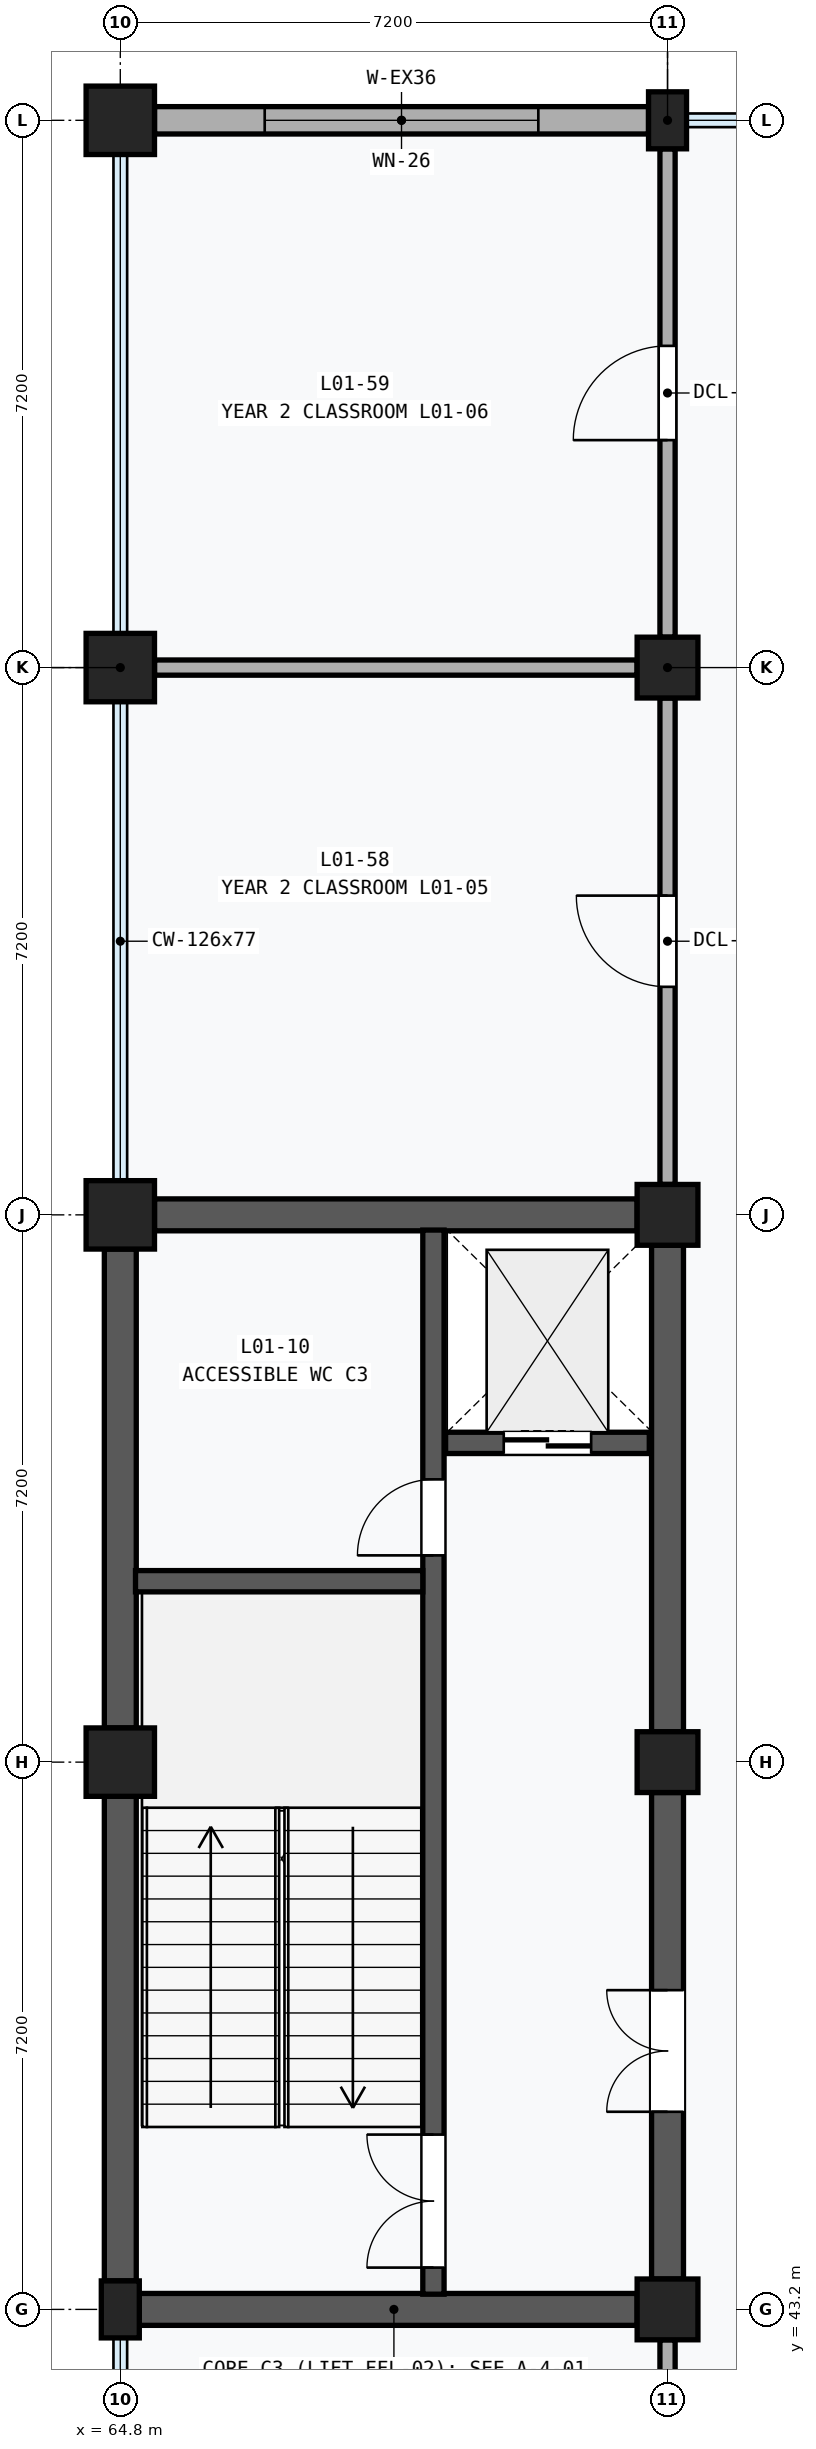
"""IFC4 building model, lengths in metres.
Left out: names, types, materials, properties, quantities, classifications, styles, units other than length and angle.
Written with IfcOpenShell. Run it as: python <this file> out.ifc"""

import sys

from ifc_helpers import new_model, si_unit, direction, frame, frame_2d, origin, origin_2d, place, context, subcontext, project, spatial, rectangle, extrude, element, fill, save


model = new_model("IFC4")
c1 = context("Model", 3, precision=1e-05, world=origin(), true_north=direction((0.0, 1.0)))
c2 = subcontext(c1, "Body", "Model", "MODEL_VIEW")
j1 = project(units=[si_unit("LENGTHUNIT", "METRE"), si_unit("PLANEANGLEUNIT", "RADIAN")], contexts=[c1])
p1 = place(None, origin())
s1 = spatial("IfcSite", under=j1, at=p1, CompositionType="ELEMENT")
p2 = place(p1, origin())
s2 = spatial("IfcBuilding", under=s1, at=p2, CompositionType="ELEMENT")
p3 = place(p2, frame((0.0, 0.0, 4.8)))
s3 = spatial("IfcBuildingStorey", under=s2, at=p3, CompositionType="ELEMENT", Elevation=4.8)
p4 = place(p3, frame((64.8, 43.2, 0.0), z_axis=(0.0, 0.0, 1.0), x_axis=(1.0, 0.0, 0.0)))
e1 = element("IfcColumn", 1, at=p4, inside=s3, PredefinedType="PILASTER", context=c2, shape_type="SweptSolid", body=[
    extrude(rectangle(XDim=0.5, YDim=0.75, at=origin_2d()), origin(), (0.0, 0.0, 1.0), 4.8),
])
for number, where, z_axis, x_axis in (
    (2, (64.8, 50.4, 0.0), (0.0, 0.0, 1.0), (1.0, 0.0, 0.0)),
    (3, (64.8, 57.6, 0.0), (0.0, 0.0, 1.0), (1.0, 0.0, 0.0)),
    (4, (64.8, 64.8, 0.0), (0.0, 0.0, 1.0), (1.0, 0.0, 0.0)),
    (5, (64.8, 72.0, 0.0), (0.0, 0.0, 1.0), (1.0, 0.0, 0.0)),
):
    element("IfcColumn", number, at=place(p3, frame(where, z_axis=z_axis, x_axis=x_axis)), inside=s3, PredefinedType="COLUMN", context=c2, shape_type="SweptSolid", body=[
        extrude(rectangle(XDim=0.9, YDim=0.9, at=origin_2d()), origin(), (0.0, 0.0, 1.0), 4.8),
    ])
for number, where, z_axis, x_axis in (
    (6, (72.0, 43.2, 0.0), (0.0, 0.0, 1.0), (1.0, 0.0, 0.0)),
    (7, (72.0, 50.4, 0.0), (0.0, 0.0, 1.0), (1.0, 0.0, 0.0)),
    (8, (72.0, 57.6, 0.0), (0.0, 0.0, 1.0), (1.0, 0.0, 0.0)),
    (9, (72.0, 64.8, 0.0), (0.0, 0.0, 1.0), (1.0, 0.0, 0.0)),
):
    element("IfcColumn", number, at=place(p3, frame(where, z_axis=z_axis, x_axis=x_axis)), inside=s3, PredefinedType="COLUMN", context=c2, shape_type="SweptSolid", body=[
        extrude(rectangle(XDim=0.8, YDim=0.8, at=origin_2d()), origin(), (0.0, 0.0, 1.0), 4.8),
    ])
p5 = place(p3, frame((72.0, 72.0, 0.0), z_axis=(0.0, 0.0, 1.0), x_axis=(1.0, 0.0, 0.0)))
e10 = element("IfcColumn", 10, at=p5, inside=s3, PredefinedType="PILASTER", context=c2, shape_type="SweptSolid", body=[
    extrude(rectangle(XDim=0.5, YDim=0.75, at=origin_2d()), origin(), (0.0, 0.0, 1.0), 4.8),
])
p6 = place(p3, frame((65.25, 72.0, 0.0), z_axis=(0.0, 0.0, 1.0), x_axis=(1.0, 0.0, 0.0)))
e11 = element("IfcWall", 11, at=p6, inside=s3, PredefinedType="SOLIDWALL", context=c2, shape_type="SweptSolid", body=[
    extrude(rectangle(XDim=6.5, YDim=0.36, at=frame_2d((3.25, 0.0))), origin(), (0.0, 0.0, 1.0), 3.85),
])
p7 = place(p6, frame((1.45, 0.0, 0.7)))
e12 = element("IfcOpeningElement", 12, at=p7, cuts=e11, PredefinedType="OPENING", context=c2, shape_type="SweptSolid", body=[
    extrude(rectangle(XDim=3.6, YDim=2.2, at=frame_2d((1.8, 1.1))), frame((0.0, 0.192, 0.0), z_axis=(0.0, -1.0, 0.0), x_axis=(1.0, 0.0, 0.0)), (0.0, 0.0, 1.0), 0.384),
])
p8 = place(p3, frame((64.8, 43.575, 0.0), z_axis=(0.0, 0.0, 1.0), x_axis=(0.0, 1.0, 0.0)))
e13 = element("IfcWall", 13, at=p8, inside=s3, PredefinedType="SHEAR", context=c2, shape_type="SweptSolid", body=[
    extrude(rectangle(XDim=6.375, YDim=0.42, at=frame_2d((3.188, 0.0))), origin(), (0.0, 0.0, 1.0), 3.85),
])
p9 = place(p3, frame((64.8, 50.85, 0.0), z_axis=(0.0, 0.0, 1.0), x_axis=(0.0, 1.0, 0.0)))
e14 = element("IfcWall", 14, at=p9, inside=s3, PredefinedType="SHEAR", context=c2, shape_type="SweptSolid", body=[
    extrude(rectangle(XDim=6.3, YDim=0.42, at=frame_2d((3.15, 0.0))), origin(), (0.0, 0.0, 1.0), 3.85),
])
p10 = place(p3, frame((72.0, 43.6, 0.0), z_axis=(0.0, 0.0, 1.0), x_axis=(0.0, 1.0, 0.0)))
e15 = element("IfcWall", 15, at=p10, inside=s3, PredefinedType="SHEAR", context=c2, shape_type="SweptSolid", body=[
    extrude(rectangle(XDim=6.4, YDim=0.42, at=frame_2d((3.2, 0.0))), origin(), (0.0, 0.0, 1.0), 3.58),
])
p11 = place(p10, frame((2.2, 0.0, 0.0)))
e16 = element("IfcOpeningElement", 16, at=p11, cuts=e15, PredefinedType="OPENING", context=c2, shape_type="SweptSolid", body=[
    extrude(rectangle(XDim=1.6, YDim=2.2, at=frame_2d((0.8, 1.1))), frame((0.0, 0.222, 0.0), z_axis=(0.0, -1.0, 0.0), x_axis=(1.0, 0.0, 0.0)), (0.0, 0.0, 1.0), 0.444),
])
p12 = place(p3, frame((72.0, 50.8, 0.0), z_axis=(0.0, 0.0, 1.0), x_axis=(0.0, 1.0, 0.0)))
e17 = element("IfcWall", 17, at=p12, inside=s3, PredefinedType="SHEAR", context=c2, shape_type="SweptSolid", body=[
    extrude(rectangle(XDim=6.4, YDim=0.42, at=frame_2d((3.2, 0.0))), origin(), (0.0, 0.0, 1.0), 3.58),
])
p13 = place(p3, frame((65.05, 43.2, 0.0), z_axis=(0.0, 0.0, 1.0), x_axis=(1.0, 0.0, 0.0)))
e18 = element("IfcWall", 18, at=p13, inside=s3, PredefinedType="SHEAR", context=c2, shape_type="SweptSolid", body=[
    extrude(rectangle(XDim=6.55, YDim=0.42, at=frame_2d((3.275, 0.0))), origin(), (0.0, 0.0, 1.0), 3.58),
])
p14 = place(p3, frame((65.25, 57.6, 0.0), z_axis=(0.0, 0.0, 1.0), x_axis=(1.0, 0.0, 0.0)))
e19 = element("IfcWall", 19, at=p14, inside=s3, PredefinedType="SHEAR", context=c2, shape_type="SweptSolid", body=[
    extrude(rectangle(XDim=6.35, YDim=0.42, at=frame_2d((3.175, 0.0))), origin(), (0.0, 0.0, 1.0), 3.58),
])
p15 = place(p3, frame((68.92, 43.4, 0.0), z_axis=(0.0, 0.0, 1.0), x_axis=(0.0, 1.0, 0.0)))
e20 = element("IfcWall", 20, at=p15, inside=s3, PredefinedType="SHEAR", context=c2, shape_type="SweptSolid", body=[
    extrude(rectangle(XDim=14.0, YDim=0.28, at=frame_2d((7.0, 0.0))), origin(), (0.0, 0.0, 1.0), 4.48),
])
p16 = place(p15, frame((0.35, 0.0, 0.0)))
e21 = element("IfcOpeningElement", 21, at=p16, cuts=e20, PredefinedType="OPENING", context=c2, shape_type="SweptSolid", body=[
    extrude(rectangle(XDim=1.75, YDim=2.15, at=frame_2d((0.875, 1.075))), frame((0.0, 0.152, 0.0), z_axis=(0.0, -1.0, 0.0), x_axis=(1.0, 0.0, 0.0)), (0.0, 0.0, 1.0), 0.304),
])
p17 = place(p15, frame((9.72, 0.0, 0.0)))
e22 = element("IfcOpeningElement", 22, at=p17, cuts=e20, PredefinedType="OPENING", context=c2, shape_type="SweptSolid", body=[
    extrude(rectangle(XDim=1.0, YDim=2.15, at=frame_2d((0.5, 1.075))), frame((0.0, 0.152, 0.0), z_axis=(0.0, -1.0, 0.0), x_axis=(1.0, 0.0, 0.0)), (0.0, 0.0, 1.0), 0.304),
])
p18 = place(p3, frame((65.0, 52.78, 0.0), z_axis=(0.0, 0.0, 1.0), x_axis=(1.0, 0.0, 0.0)))
e23 = element("IfcWall", 23, at=p18, inside=s3, PredefinedType="SHEAR", context=c2, shape_type="SweptSolid", body=[
    extrude(rectangle(XDim=3.78, YDim=0.28, at=frame_2d((1.89, 0.0))), origin(), (0.0, 0.0, 1.0), 4.48),
])
p19 = place(p3, frame((69.08, 54.6, 0.0), z_axis=(0.0, 0.0, 1.0), x_axis=(1.0, 0.0, 0.0)))
e24 = element("IfcWall", 24, at=p19, inside=s3, PredefinedType="SHEAR", context=c2, shape_type="SweptSolid", body=[
    extrude(rectangle(XDim=2.68, YDim=0.28, at=frame_2d((1.34, 0.0))), origin(), (0.0, 0.0, 1.0), 4.48),
])
p20 = place(p19, frame((0.765, 0.0, 0.0)))
e25 = element("IfcOpeningElement", 25, at=p20, cuts=e24, PredefinedType="OPENING", context=c2, shape_type="SweptSolid", body=[
    extrude(rectangle(XDim=1.15, YDim=2.2, at=frame_2d((0.575, 1.1))), frame((0.0, 0.152, 0.0), z_axis=(0.0, -1.0, 0.0), x_axis=(1.0, 0.0, 0.0)), (0.0, 0.0, 1.0), 0.304),
])
p21 = place(p3, frame((72.0, 36.4, 0.0), z_axis=(0.0, 0.0, 1.0), x_axis=(0.0, 1.0, 0.0)))
e26 = element("IfcWall", 26, at=p21, inside=s3, PredefinedType="PARTITIONING", context=c2, shape_type="SweptSolid", body=[
    extrude(rectangle(XDim=6.4, YDim=0.2, at=frame_2d((3.2, 0.0))), origin(), (0.0, 0.0, 1.0), 3.58),
])
p22 = place(p21, frame((2.62, 0.0, 0.0)))
e27 = element("IfcOpeningElement", 27, at=p22, cuts=e26, PredefinedType="OPENING", context=c2, shape_type="SweptSolid", body=[
    extrude(rectangle(XDim=1.16, YDim=2.22, at=frame_2d((0.58, 1.11))), frame((0.0, 0.112, 0.0), z_axis=(0.0, -1.0, 0.0), x_axis=(1.0, 0.0, 0.0)), (0.0, 0.0, 1.0), 0.224),
])
p23 = place(p3, frame((65.25, 64.8, 0.0), z_axis=(0.0, 0.0, 1.0), x_axis=(1.0, 0.0, 0.0)))
e28 = element("IfcWall", 28, at=p23, inside=s3, PredefinedType="PARTITIONING", context=c2, shape_type="SweptSolid", body=[
    extrude(rectangle(XDim=6.35, YDim=0.2, at=frame_2d((3.175, 0.0))), origin(), (0.0, 0.0, 1.0), 3.58),
])
p24 = place(p3, frame((72.0, 58.0, 0.0), z_axis=(0.0, 0.0, 1.0), x_axis=(0.0, 1.0, 0.0)))
e29 = element("IfcWall", 29, at=p24, inside=s3, PredefinedType="PARTITIONING", context=c2, shape_type="SweptSolid", body=[
    extrude(rectangle(XDim=6.4, YDim=0.2, at=frame_2d((3.2, 0.0))), origin(), (0.0, 0.0, 1.0), 3.58),
])
p25 = place(p24, frame((2.6, 0.0, 0.0)))
e30 = element("IfcOpeningElement", 30, at=p25, cuts=e29, PredefinedType="OPENING", context=c2, shape_type="SweptSolid", body=[
    extrude(rectangle(XDim=1.2, YDim=2.24, at=frame_2d((0.6, 1.12))), frame((0.0, 0.112, 0.0), z_axis=(0.0, -1.0, 0.0), x_axis=(1.0, 0.0, 0.0)), (0.0, 0.0, 1.0), 0.224),
])
p26 = place(p3, frame((72.0, 65.2, 0.0), z_axis=(0.0, 0.0, 1.0), x_axis=(0.0, 1.0, 0.0)))
e31 = element("IfcWall", 31, at=p26, inside=s3, PredefinedType="PARTITIONING", context=c2, shape_type="SweptSolid", body=[
    extrude(rectangle(XDim=6.425, YDim=0.2, at=frame_2d((3.212, 0.0))), origin(), (0.0, 0.0, 1.0), 3.58),
])
p27 = place(p26, frame((2.593, 0.0, 0.0)))
e32 = element("IfcOpeningElement", 32, at=p27, cuts=e31, PredefinedType="OPENING", context=c2, shape_type="SweptSolid", body=[
    extrude(rectangle(XDim=1.24, YDim=2.26, at=frame_2d((0.62, 1.13))), frame((0.0, 0.112, 0.0), z_axis=(0.0, -1.0, 0.0), x_axis=(1.0, 0.0, 0.0)), (0.0, 0.0, 1.0), 0.224),
])
p28 = place(p7, origin())
e33 = element("IfcWindow", 33, at=p28, inside=s3, PartitioningType="SINGLE_PANEL", PredefinedType="WINDOW", context=c2, shape_type="SweptSolid", body=[
    extrude(rectangle(XDim=3.6, YDim=2.2, at=frame_2d((1.8, 1.1))), frame((0.0, 0.03, 0.0), z_axis=(0.0, -1.0, 0.0), x_axis=(1.0, 0.0, 0.0)), (0.0, 0.0, 1.0), 0.06),
])
fill(e12, e33)
p29 = place(p11, origin())
e34 = element("IfcDoor", 34, at=p29, inside=s3, OperationType="DOUBLE_DOOR_SINGLE_SWING", PredefinedType="DOOR", context=c2, shape_type="SweptSolid", body=[
    extrude(rectangle(XDim=1.6, YDim=2.2, at=frame_2d((0.8, 1.1))), frame((0.0, 0.025, 0.0), z_axis=(0.0, -1.0, 0.0), x_axis=(1.0, 0.0, 0.0)), (0.0, 0.0, 1.0), 0.05),
])
fill(e16, e34)
p30 = place(p16, origin())
e35 = element("IfcDoor", 35, at=p30, inside=s3, OperationType="DOUBLE_DOOR_SINGLE_SWING", PredefinedType="DOOR", context=c2, shape_type="SweptSolid", body=[
    extrude(rectangle(XDim=1.75, YDim=2.15, at=frame_2d((0.875, 1.075))), frame((0.0, 0.025, 0.0), z_axis=(0.0, -1.0, 0.0), x_axis=(1.0, 0.0, 0.0)), (0.0, 0.0, 1.0), 0.05),
])
fill(e21, e35)
p31 = place(p17, origin())
e36 = element("IfcDoor", 36, at=p31, inside=s3, OperationType="SINGLE_SWING_LEFT", PredefinedType="DOOR", context=c2, shape_type="SweptSolid", body=[
    extrude(rectangle(XDim=1.0, YDim=2.15, at=frame_2d((0.5, 1.075))), frame((0.0, 0.025, 0.0), z_axis=(0.0, -1.0, 0.0), x_axis=(1.0, 0.0, 0.0)), (0.0, 0.0, 1.0), 0.05),
])
fill(e22, e36)
p32 = place(p20, frame((1.15, 0.0, 0.0), z_axis=(0.0, 0.0, 1.0), x_axis=(-1.0, 0.0, 0.0)))
e37 = element("IfcDoor", 37, at=p32, inside=s3, OperationType="DOUBLE_DOOR_SLIDING", PredefinedType="DOOR", context=c2, shape_type="SweptSolid", body=[
    extrude(rectangle(XDim=1.15, YDim=2.2, at=frame_2d((0.575, 1.1))), frame((0.0, 0.025, 0.0), z_axis=(0.0, -1.0, 0.0), x_axis=(1.0, 0.0, 0.0)), (0.0, 0.0, 1.0), 0.05),
])
fill(e25, e37)
p33 = place(p25, origin())
e38 = element("IfcDoor", 38, at=p33, inside=s3, OperationType="SINGLE_SWING_RIGHT", PredefinedType="DOOR", context=c2, shape_type="SweptSolid", body=[
    extrude(rectangle(XDim=1.2, YDim=2.24, at=frame_2d((0.6, 1.12))), frame((0.0, 0.025, 0.0), z_axis=(0.0, -1.0, 0.0), x_axis=(1.0, 0.0, 0.0)), (0.0, 0.0, 1.0), 0.05),
])
fill(e30, e38)
p34 = place(p27, origin())
e39 = element("IfcDoor", 39, at=p34, inside=s3, OperationType="SINGLE_SWING_LEFT", PredefinedType="DOOR", context=c2, shape_type="SweptSolid", body=[
    extrude(rectangle(XDim=1.24, YDim=2.26, at=frame_2d((0.62, 1.13))), frame((0.0, 0.025, 0.0), z_axis=(0.0, -1.0, 0.0), x_axis=(1.0, 0.0, 0.0)), (0.0, 0.0, 1.0), 0.05),
])
fill(e32, e39)
save(model, sys.argv[1])
